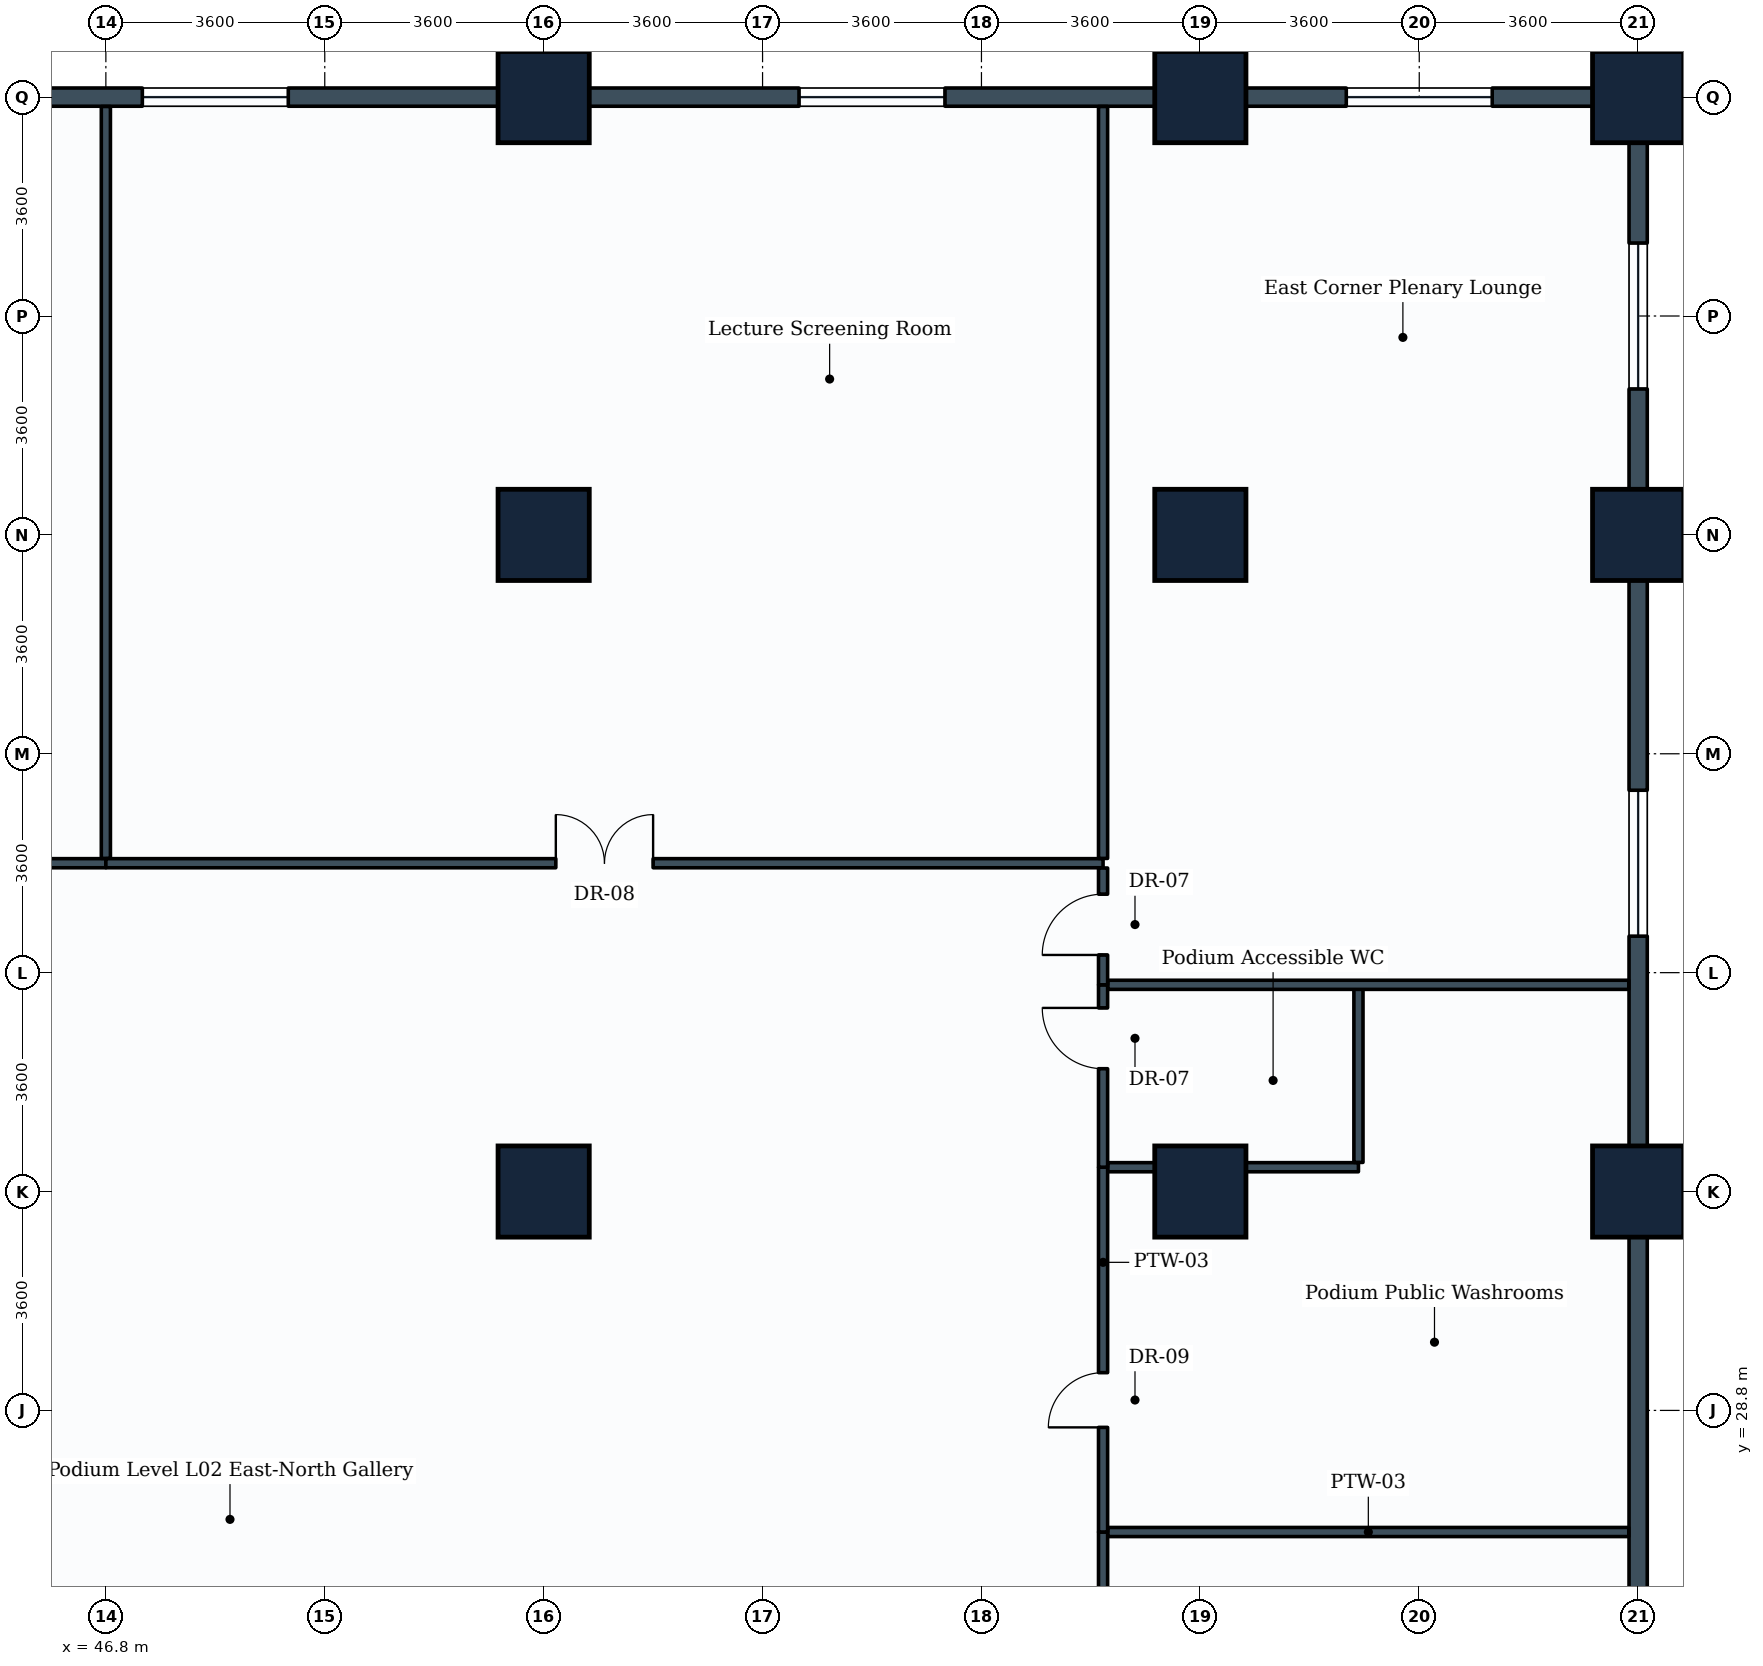
"""IFC4 building model, lengths in metres.
Left out: names, types, materials, properties, quantities, classifications, styles, units other than length and angle.
Written with IfcOpenShell. Run it as: python <this file> out.ifc"""

import sys

from ifc_helpers import new_model, si_unit, direction, frame, frame_2d, origin, origin_2d, place, context, subcontext, project, spatial, rectangle, extrude, element, fill, save


model = new_model("IFC4")
c1 = context("Model", 3, precision=1e-05, world=origin(), true_north=direction((0.0, 1.0)))
c2 = subcontext(c1, "Body", "Model", "MODEL_VIEW")
j1 = project(units=[si_unit("LENGTHUNIT", "METRE"), si_unit("PLANEANGLEUNIT", "RADIAN")], contexts=[c1])
p1 = place(None, origin())
s1 = spatial("IfcSite", under=j1, at=p1, CompositionType="ELEMENT")
p2 = place(p1, origin())
s2 = spatial("IfcBuilding", under=s1, at=p2, CompositionType="ELEMENT")
p3 = place(p2, frame((0.0, 0.0, 10.2)))
s3 = spatial("IfcBuildingStorey", under=s2, at=p3, CompositionType="ELEMENT", Elevation=10.2)
for number, where, z_axis, x_axis in (
    (1, (54.0, 32.4, 0.0), (0.0, 0.0, 1.0), (1.0, 0.0, 0.0)),
    (2, (54.0, 43.2, 0.0), (0.0, 0.0, 1.0), (1.0, 0.0, 0.0)),
    (3, (54.0, 50.4, 0.0), (0.0, 0.0, 1.0), (1.0, 0.0, 0.0)),
    (4, (64.8, 32.4, 0.0), (0.0, 0.0, 1.0), (1.0, 0.0, 0.0)),
    (5, (64.8, 43.2, 0.0), (0.0, 0.0, 1.0), (1.0, 0.0, 0.0)),
    (6, (64.8, 50.4, 0.0), (0.0, 0.0, 1.0), (1.0, 0.0, 0.0)),
    (7, (72.0, 32.4, 0.0), (0.0, 0.0, 1.0), (1.0, 0.0, 0.0)),
    (8, (72.0, 43.2, 0.0), (0.0, 0.0, 1.0), (1.0, 0.0, 0.0)),
    (9, (72.0, 50.4, 0.0), (0.0, 0.0, 1.0), (1.0, 0.0, 0.0)),
):
    element("IfcColumn", number, at=place(p3, frame(where, z_axis=z_axis, x_axis=x_axis)), inside=s3, PredefinedType="COLUMN", context=c2, shape_type="SweptSolid", body=[
        extrude(rectangle(XDim=1.5, YDim=1.5, at=origin_2d()), origin(), (0.0, 0.0, 1.0), 4.6),
    ])
p4 = place(p3, frame((72.0, 32.4, 0.0), z_axis=(0.0, 0.0, 1.0), x_axis=(0.0, -1.0, 0.0)))
e10 = element("IfcWall", 10, at=p4, inside=s3, PredefinedType="STANDARD", context=c2, shape_type="SweptSolid", body=[
    extrude(rectangle(XDim=10.8, YDim=0.3, at=frame_2d((5.4, 0.0))), origin(), (0.0, 0.0, 1.0), 3.63),
])
p5 = place(p3, frame((72.0, 43.2, 0.0), z_axis=(0.0, 0.0, 1.0), x_axis=(0.0, -1.0, 0.0)))
e11 = element("IfcWall", 11, at=p5, inside=s3, PredefinedType="STANDARD", context=c2, shape_type="SweptSolid", body=[
    extrude(rectangle(XDim=10.8, YDim=0.3, at=frame_2d((5.4, 0.0))), origin(), (0.0, 0.0, 1.0), 3.63),
])
p6 = place(p5, frame((4.2, 0.0, 0.85)))
e12 = element("IfcOpeningElement", 12, at=p6, cuts=e11, PredefinedType="OPENING", context=c2, shape_type="SweptSolid", body=[
    extrude(rectangle(XDim=2.4, YDim=1.6, at=frame_2d((1.2, 0.8))), frame((0.0, 0.16, 0.0), z_axis=(0.0, -1.0, 0.0), x_axis=(1.0, 0.0, 0.0)), (0.0, 0.0, 1.0), 0.32),
])
p7 = place(p3, frame((72.0, 50.4, 0.0), z_axis=(0.0, 0.0, 1.0), x_axis=(0.0, -1.0, 0.0)))
e13 = element("IfcWall", 13, at=p7, inside=s3, PredefinedType="STANDARD", context=c2, shape_type="SweptSolid", body=[
    extrude(rectangle(XDim=7.2, YDim=0.3, at=frame_2d((3.6, 0.0))), origin(), (0.0, 0.0, 1.0), 3.63),
])
p8 = place(p7, frame((2.4, 0.0, 0.85)))
e14 = element("IfcOpeningElement", 14, at=p8, cuts=e13, PredefinedType="OPENING", context=c2, shape_type="SweptSolid", body=[
    extrude(rectangle(XDim=2.4, YDim=1.6, at=frame_2d((1.2, 0.8))), frame((0.0, 0.16, 0.0), z_axis=(0.0, -1.0, 0.0), x_axis=(1.0, 0.0, 0.0)), (0.0, 0.0, 1.0), 0.32),
])
p9 = place(p3, frame((43.2, 50.4, 0.0), z_axis=(0.0, 0.0, 1.0), x_axis=(1.0, 0.0, 0.0)))
e15 = element("IfcWall", 15, at=p9, inside=s3, PredefinedType="STANDARD", context=c2, shape_type="SweptSolid", body=[
    extrude(rectangle(XDim=10.8, YDim=0.3, at=frame_2d((5.4, 0.0))), origin(), (0.0, 0.0, 1.0), 3.63),
])
p10 = place(p9, frame((4.2, 0.0, 0.85)))
e16 = element("IfcOpeningElement", 16, at=p10, cuts=e15, PredefinedType="OPENING", context=c2, shape_type="SweptSolid", body=[
    extrude(rectangle(XDim=2.4, YDim=1.6, at=frame_2d((1.2, 0.8))), frame((0.0, 0.16, 0.0), z_axis=(0.0, -1.0, 0.0), x_axis=(1.0, 0.0, 0.0)), (0.0, 0.0, 1.0), 0.32),
])
p11 = place(p3, frame((54.0, 50.4, 0.0), z_axis=(0.0, 0.0, 1.0), x_axis=(1.0, 0.0, 0.0)))
e17 = element("IfcWall", 17, at=p11, inside=s3, PredefinedType="STANDARD", context=c2, shape_type="SweptSolid", body=[
    extrude(rectangle(XDim=10.8, YDim=0.3, at=frame_2d((5.4, 0.0))), origin(), (0.0, 0.0, 1.0), 3.63),
])
p12 = place(p11, frame((4.2, 0.0, 0.85)))
e18 = element("IfcOpeningElement", 18, at=p12, cuts=e17, PredefinedType="OPENING", context=c2, shape_type="SweptSolid", body=[
    extrude(rectangle(XDim=2.4, YDim=1.6, at=frame_2d((1.2, 0.8))), frame((0.0, 0.16, 0.0), z_axis=(0.0, -1.0, 0.0), x_axis=(1.0, 0.0, 0.0)), (0.0, 0.0, 1.0), 0.32),
])
p13 = place(p3, frame((64.8, 50.4, 0.0), z_axis=(0.0, 0.0, 1.0), x_axis=(1.0, 0.0, 0.0)))
e19 = element("IfcWall", 19, at=p13, inside=s3, PredefinedType="STANDARD", context=c2, shape_type="SweptSolid", body=[
    extrude(rectangle(XDim=7.2, YDim=0.3, at=frame_2d((3.6, 0.0))), origin(), (0.0, 0.0, 1.0), 3.63),
])
p14 = place(p13, frame((2.4, 0.0, 0.85)))
e20 = element("IfcOpeningElement", 20, at=p14, cuts=e19, PredefinedType="OPENING", context=c2, shape_type="SweptSolid", body=[
    extrude(rectangle(XDim=2.4, YDim=1.6, at=frame_2d((1.2, 0.8))), frame((0.0, 0.16, 0.0), z_axis=(0.0, -1.0, 0.0), x_axis=(1.0, 0.0, 0.0)), (0.0, 0.0, 1.0), 0.32),
])
p15 = place(p3, frame((28.8, 37.8, 0.0), z_axis=(0.0, 0.0, 1.0), x_axis=(1.0, 0.0, 0.0)))
e21 = element("IfcWall", 21, at=p15, inside=s3, PredefinedType="PARTITIONING", context=c2, shape_type="SweptSolid", body=[
    extrude(rectangle(XDim=18.0, YDim=0.15, at=frame_2d((9.0, 0.0))), origin(), (0.0, 0.0, 1.0), 3.63),
])
p16 = place(p15, frame((8.2, 0.0, 0.0)))
e22 = element("IfcOpeningElement", 22, at=p16, cuts=e21, PredefinedType="OPENING", context=c2, shape_type="SweptSolid", body=[
    extrude(rectangle(XDim=1.6, YDim=2.2, at=frame_2d((0.8, 1.1))), frame((0.0, 0.085, 0.0), z_axis=(0.0, -1.0, 0.0), x_axis=(1.0, 0.0, 0.0)), (0.0, 0.0, 1.0), 0.17),
])
p17 = place(p3, frame((46.8, 37.879, 0.0), z_axis=(0.0, 0.0, 1.0), x_axis=(0.0, 1.0, 0.0)))
e23 = element("IfcWall", 23, at=p17, inside=s3, PredefinedType="PARTITIONING", context=c2, shape_type="SweptSolid", body=[
    extrude(rectangle(XDim=12.367, YDim=0.15, at=frame_2d((6.184, 0.0))), origin(), (0.0, 0.0, 1.0), 3.63),
])
p18 = place(p3, frame((46.8, 37.8, 0.0), z_axis=(0.0, 0.0, 1.0), x_axis=(1.0, 0.0, 0.0)))
e24 = element("IfcWall", 24, at=p18, inside=s3, PredefinedType="PARTITIONING", context=c2, shape_type="SweptSolid", body=[
    extrude(rectangle(XDim=16.4, YDim=0.15, at=frame_2d((8.2, 0.0))), origin(), (0.0, 0.0, 1.0), 3.63),
])
p19 = place(p18, frame((7.4, 0.0, 0.0)))
e25 = element("IfcOpeningElement", 25, at=p19, cuts=e24, PredefinedType="OPENING", context=c2, shape_type="SweptSolid", body=[
    extrude(rectangle(XDim=1.6, YDim=2.2, at=frame_2d((0.8, 1.1))), frame((0.0, 0.085, 0.0), z_axis=(0.0, -1.0, 0.0), x_axis=(1.0, 0.0, 0.0)), (0.0, 0.0, 1.0), 0.17),
])
p20 = place(p3, frame((63.2, 16.2, 0.0), z_axis=(0.0, 0.0, 1.0), x_axis=(0.0, 1.0, 0.0)))
e26 = element("IfcWall", 26, at=p20, inside=s3, PredefinedType="PARTITIONING", context=c2, shape_type="SweptSolid", body=[
    extrude(rectangle(XDim=10.6, YDim=0.15, at=frame_2d((5.3, 0.0))), origin(), (0.0, 0.0, 1.0), 3.63),
])
p21 = place(p20, frame((1.172, 0.0, 0.0)))
e27 = element("IfcOpeningElement", 27, at=p21, cuts=e26, PredefinedType="OPENING", context=c2, shape_type="SweptSolid", body=[
    extrude(rectangle(XDim=1.6, YDim=2.2, at=frame_2d((0.8, 1.1))), frame((0.0, 0.085, 0.0), z_axis=(0.0, -1.0, 0.0), x_axis=(1.0, 0.0, 0.0)), (0.0, 0.0, 1.0), 0.17),
])
p22 = place(p3, frame((63.279, 26.8, 0.0), z_axis=(0.0, 0.0, 1.0), x_axis=(1.0, 0.0, 0.0)))
e28 = element("IfcWall", 28, at=p22, inside=s3, PredefinedType="PARTITIONING", context=c2, shape_type="SweptSolid", body=[
    extrude(rectangle(XDim=8.567, YDim=0.15, at=frame_2d((4.283, 0.0))), origin(), (0.0, 0.0, 1.0), 3.63),
])
p23 = place(p3, frame((63.2, 26.8, 0.0), z_axis=(0.0, 0.0, 1.0), x_axis=(0.0, 1.0, 0.0)))
e29 = element("IfcWall", 29, at=p23, inside=s3, PredefinedType="PARTITIONING", context=c2, shape_type="SweptSolid", body=[
    extrude(rectangle(XDim=6.0, YDim=0.15, at=frame_2d((3.0, 0.0))), origin(), (0.0, 0.0, 1.0), 3.63),
])
p24 = place(p23, frame((1.721, 0.0, 0.0)))
e30 = element("IfcOpeningElement", 30, at=p24, cuts=e29, PredefinedType="OPENING", context=c2, shape_type="SweptSolid", body=[
    extrude(rectangle(XDim=0.9, YDim=2.1, at=frame_2d((0.45, 1.05))), frame((0.0, 0.085, 0.0), z_axis=(0.0, -1.0, 0.0), x_axis=(1.0, 0.0, 0.0)), (0.0, 0.0, 1.0), 0.17),
])
p25 = place(p3, frame((63.279, 32.8, 0.0), z_axis=(0.0, 0.0, 1.0), x_axis=(1.0, 0.0, 0.0)))
e31 = element("IfcWall", 31, at=p25, inside=s3, PredefinedType="PARTITIONING", context=c2, shape_type="SweptSolid", body=[
    extrude(rectangle(XDim=4.121, YDim=0.15, at=frame_2d((2.061, 0.0))), origin(), (0.0, 0.0, 1.0), 3.63),
])
p26 = place(p3, frame((67.4, 32.879, 0.0), z_axis=(0.0, 0.0, 1.0), x_axis=(0.0, 1.0, 0.0)))
e32 = element("IfcWall", 32, at=p26, inside=s3, PredefinedType="PARTITIONING", context=c2, shape_type="SweptSolid", body=[
    extrude(rectangle(XDim=2.921, YDim=0.15, at=frame_2d((1.46, 0.0))), origin(), (0.0, 0.0, 1.0), 4.285),
])
p27 = place(p3, frame((63.2, 32.8, 0.0), z_axis=(0.0, 0.0, 1.0), x_axis=(0.0, 1.0, 0.0)))
e33 = element("IfcWall", 33, at=p27, inside=s3, PredefinedType="PARTITIONING", context=c2, shape_type="SweptSolid", body=[
    extrude(rectangle(XDim=3.0, YDim=0.15, at=frame_2d((1.5, 0.0))), origin(), (0.0, 0.0, 1.0), 4.285),
])
p28 = place(p27, frame((1.62, 0.0, 0.0)))
e34 = element("IfcOpeningElement", 34, at=p28, cuts=e33, PredefinedType="OPENING", context=c2, shape_type="SweptSolid", body=[
    extrude(rectangle(XDim=1.0, YDim=2.1, at=frame_2d((0.5, 1.05))), frame((0.0, 0.085, 0.0), z_axis=(0.0, -1.0, 0.0), x_axis=(1.0, 0.0, 0.0)), (0.0, 0.0, 1.0), 0.17),
])
p29 = place(p3, frame((63.279, 35.8, 0.0), z_axis=(0.0, 0.0, 1.0), x_axis=(1.0, 0.0, 0.0)))
e35 = element("IfcWall", 35, at=p29, inside=s3, PredefinedType="PARTITIONING", context=c2, shape_type="SweptSolid", body=[
    extrude(rectangle(XDim=8.567, YDim=0.15, at=frame_2d((4.283, 0.0))), origin(), (0.0, 0.0, 1.0), 3.63),
])
p30 = place(p3, frame((63.2, 35.8, 0.0), z_axis=(0.0, 0.0, 1.0), x_axis=(0.0, 1.0, 0.0)))
e36 = element("IfcWall", 36, at=p30, inside=s3, PredefinedType="PARTITIONING", context=c2, shape_type="SweptSolid", body=[
    extrude(rectangle(XDim=1.921, YDim=0.15, at=frame_2d((0.96, 0.0))), origin(), (0.0, 0.0, 1.0), 4.285),
])
p31 = place(p30, frame((0.491, 0.0, 0.0)))
e37 = element("IfcOpeningElement", 37, at=p31, cuts=e36, PredefinedType="OPENING", context=c2, shape_type="SweptSolid", body=[
    extrude(rectangle(XDim=1.0, YDim=2.1, at=frame_2d((0.5, 1.05))), frame((0.0, 0.085, 0.0), z_axis=(0.0, -1.0, 0.0), x_axis=(1.0, 0.0, 0.0)), (0.0, 0.0, 1.0), 0.17),
])
p32 = place(p3, frame((63.2, 37.879, 0.0), z_axis=(0.0, 0.0, 1.0), x_axis=(0.0, 1.0, 0.0)))
e38 = element("IfcWall", 38, at=p32, inside=s3, PredefinedType="PARTITIONING", context=c2, shape_type="SweptSolid", body=[
    extrude(rectangle(XDim=12.367, YDim=0.15, at=frame_2d((6.184, 0.0))), origin(), (0.0, 0.0, 1.0), 3.63),
])
p33 = place(p6, origin())
e39 = element("IfcWindow", 39, at=p33, inside=s3, PartitioningType="SINGLE_PANEL", PredefinedType="WINDOW", context=c2, shape_type="SweptSolid", body=[
    extrude(rectangle(XDim=2.4, YDim=1.6, at=frame_2d((1.2, 0.8))), frame((0.0, 0.03, 0.0), z_axis=(0.0, -1.0, 0.0), x_axis=(1.0, 0.0, 0.0)), (0.0, 0.0, 1.0), 0.06),
])
fill(e12, e39)
p34 = place(p8, origin())
e40 = element("IfcWindow", 40, at=p34, inside=s3, PartitioningType="SINGLE_PANEL", PredefinedType="WINDOW", context=c2, shape_type="SweptSolid", body=[
    extrude(rectangle(XDim=2.4, YDim=1.6, at=frame_2d((1.2, 0.8))), frame((0.0, 0.03, 0.0), z_axis=(0.0, -1.0, 0.0), x_axis=(1.0, 0.0, 0.0)), (0.0, 0.0, 1.0), 0.06),
])
fill(e14, e40)
p35 = place(p10, origin())
e41 = element("IfcWindow", 41, at=p35, inside=s3, PartitioningType="SINGLE_PANEL", PredefinedType="WINDOW", context=c2, shape_type="SweptSolid", body=[
    extrude(rectangle(XDim=2.4, YDim=1.6, at=frame_2d((1.2, 0.8))), frame((0.0, 0.03, 0.0), z_axis=(0.0, -1.0, 0.0), x_axis=(1.0, 0.0, 0.0)), (0.0, 0.0, 1.0), 0.06),
])
fill(e16, e41)
p36 = place(p12, origin())
e42 = element("IfcWindow", 42, at=p36, inside=s3, PartitioningType="SINGLE_PANEL", PredefinedType="WINDOW", context=c2, shape_type="SweptSolid", body=[
    extrude(rectangle(XDim=2.4, YDim=1.6, at=frame_2d((1.2, 0.8))), frame((0.0, 0.03, 0.0), z_axis=(0.0, -1.0, 0.0), x_axis=(1.0, 0.0, 0.0)), (0.0, 0.0, 1.0), 0.06),
])
fill(e18, e42)
p37 = place(p14, origin())
e43 = element("IfcWindow", 43, at=p37, inside=s3, PartitioningType="SINGLE_PANEL", PredefinedType="WINDOW", context=c2, shape_type="SweptSolid", body=[
    extrude(rectangle(XDim=2.4, YDim=1.6, at=frame_2d((1.2, 0.8))), frame((0.0, 0.03, 0.0), z_axis=(0.0, -1.0, 0.0), x_axis=(1.0, 0.0, 0.0)), (0.0, 0.0, 1.0), 0.06),
])
fill(e20, e43)
p38 = place(p19, origin())
e44 = element("IfcDoor", 44, at=p38, inside=s3, OperationType="DOUBLE_DOOR_SINGLE_SWING", PredefinedType="DOOR", context=c2, shape_type="SweptSolid", body=[
    extrude(rectangle(XDim=1.6, YDim=2.2, at=frame_2d((0.8, 1.1))), frame((0.0, 0.025, 0.0), z_axis=(0.0, -1.0, 0.0), x_axis=(1.0, 0.0, 0.0)), (0.0, 0.0, 1.0), 0.05),
])
fill(e25, e44)
p39 = place(p24, origin())
e45 = element("IfcDoor", 45, at=p39, inside=s3, OperationType="SINGLE_SWING_LEFT", PredefinedType="DOOR", context=c2, shape_type="SweptSolid", body=[
    extrude(rectangle(XDim=0.9, YDim=2.1, at=frame_2d((0.45, 1.05))), frame((0.0, 0.025, 0.0), z_axis=(0.0, -1.0, 0.0), x_axis=(1.0, 0.0, 0.0)), (0.0, 0.0, 1.0), 0.05),
])
fill(e30, e45)
p40 = place(p28, origin())
e46 = element("IfcDoor", 46, at=p40, inside=s3, OperationType="SINGLE_SWING_RIGHT", PredefinedType="DOOR", context=c2, shape_type="SweptSolid", body=[
    extrude(rectangle(XDim=1.0, YDim=2.1, at=frame_2d((0.5, 1.05))), frame((0.0, 0.025, 0.0), z_axis=(0.0, -1.0, 0.0), x_axis=(1.0, 0.0, 0.0)), (0.0, 0.0, 1.0), 0.05),
])
fill(e34, e46)
p41 = place(p31, origin())
e47 = element("IfcDoor", 47, at=p41, inside=s3, OperationType="SINGLE_SWING_LEFT", PredefinedType="DOOR", context=c2, shape_type="SweptSolid", body=[
    extrude(rectangle(XDim=1.0, YDim=2.1, at=frame_2d((0.5, 1.05))), frame((0.0, 0.025, 0.0), z_axis=(0.0, -1.0, 0.0), x_axis=(1.0, 0.0, 0.0)), (0.0, 0.0, 1.0), 0.05),
])
fill(e37, e47)
save(model, sys.argv[1])
